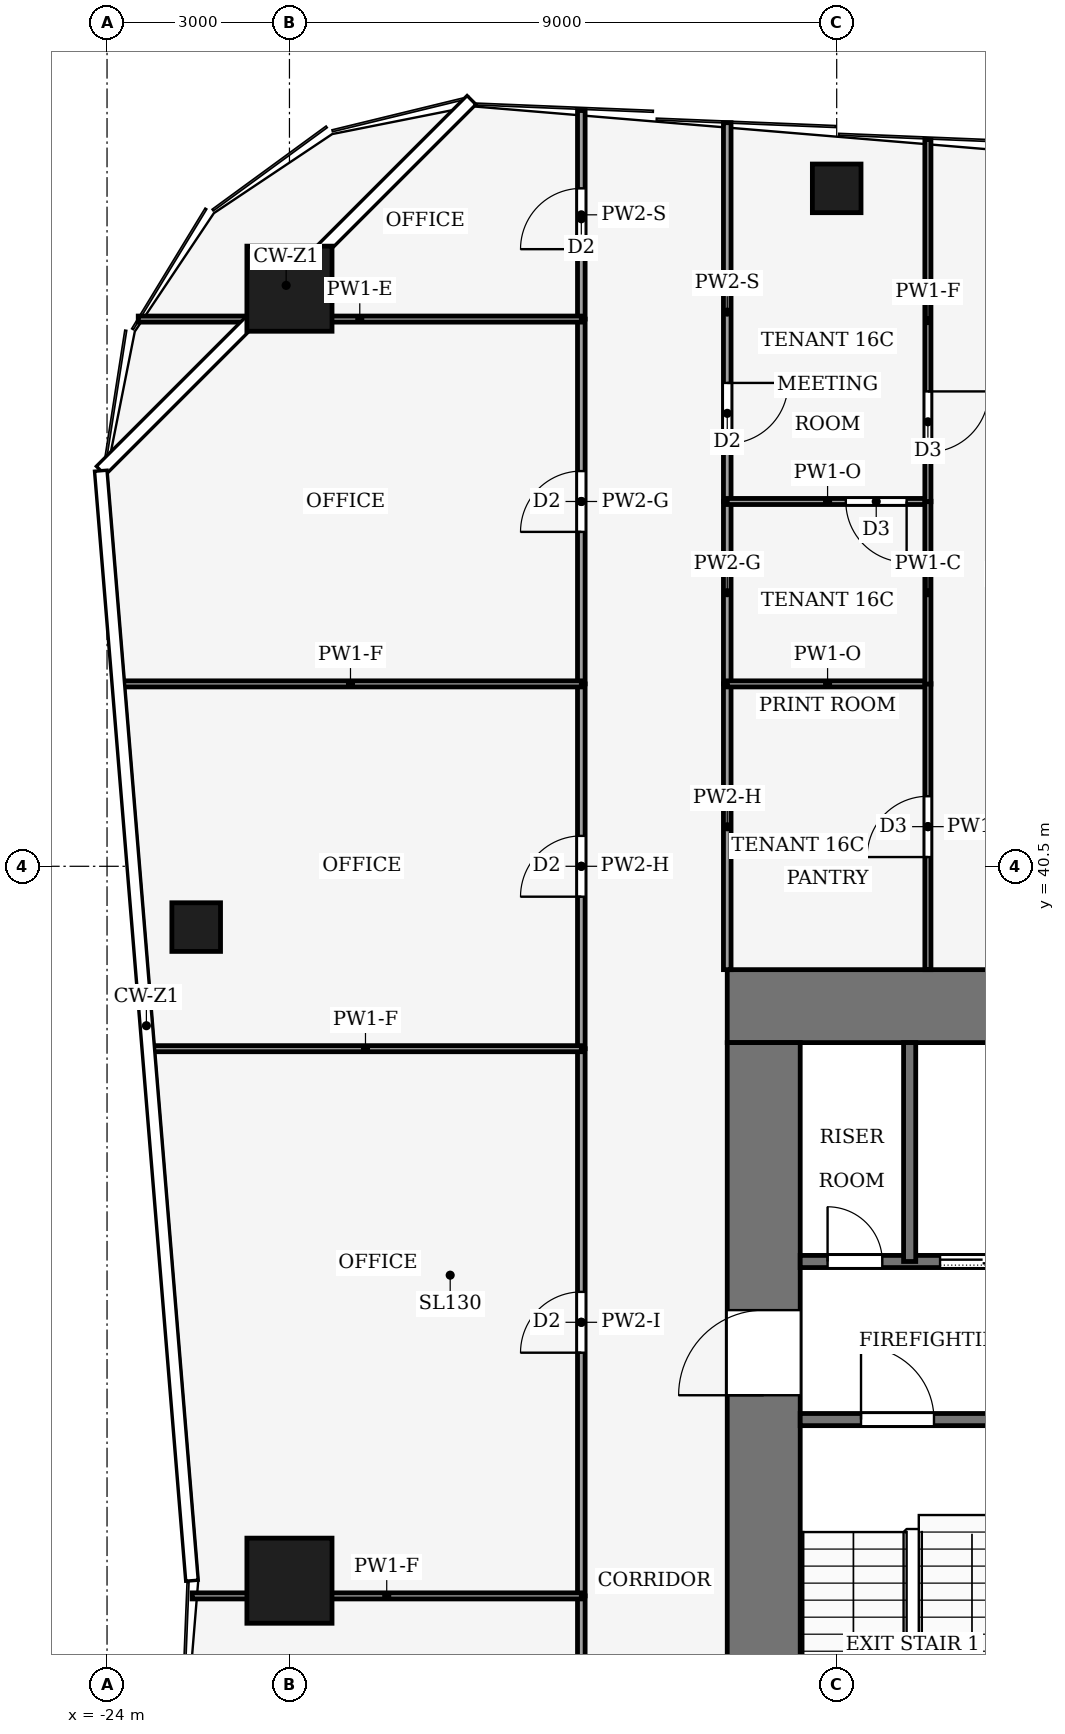
"""IFC4 building model, lengths in metres.
Left out: names, types, materials, properties, quantities, classifications, styles, units other than length and angle.
Written with IfcOpenShell. Run it as: python <this file> out.ifc"""

import sys

from ifc_helpers import new_model, si_unit, direction, frame, frame_2d, origin, origin_2d, place, context, subcontext, project, spatial, rectangle, hollow_rectangle, extrude, element, fill, save


model = new_model("IFC4")
c1 = context("Model", 3, precision=1e-05, world=origin(), true_north=direction((0.0, 1.0)))
c2 = subcontext(c1, "Body", "Model", "MODEL_VIEW")
j1 = project(units=[si_unit("LENGTHUNIT", "METRE"), si_unit("PLANEANGLEUNIT", "RADIAN")], contexts=[c1])
p1 = place(None, origin())
s1 = spatial("IfcSite", under=j1, at=p1, CompositionType="ELEMENT")
p2 = place(p1, origin())
s2 = spatial("IfcBuilding", under=s1, at=p2, CompositionType="ELEMENT")
p3 = place(p2, frame((0.0, 0.0, 74.0)))
s3 = spatial("IfcBuildingStorey", under=s2, at=p3, CompositionType="ELEMENT", Elevation=74.0)
p4 = place(p3, frame((-13.8, 38.2, -0.13), z_axis=(0.0, 0.0, 1.0), x_axis=(1.0, 0.0, 0.0)))
e1 = element("IfcWall", 1, at=p4, inside=s3, PredefinedType="SHEAR", context=c2, shape_type="SweptSolid", body=[
    extrude(rectangle(XDim=27.6, YDim=1.2, at=frame_2d((13.8, 0.0))), origin(), (0.0, 0.0, 1.0), 4.0),
])
p5 = place(p3, frame((-13.2, 18.4, -0.13), z_axis=(0.0, 0.0, 1.0), x_axis=(0.0, 1.0, 0.0)))
e2 = element("IfcWall", 2, at=p5, inside=s3, PredefinedType="SHEAR", context=c2, shape_type="SweptSolid", body=[
    extrude(rectangle(XDim=19.2, YDim=1.2, at=frame_2d((9.6, 0.0))), origin(), (0.0, 0.0, 1.0), 4.0),
])
p6 = place(p5, frame((2.8, 0.0, 0.13)))
e3 = element("IfcOpeningElement", 3, at=p6, cuts=e2, PredefinedType="OPENING", context=c2, shape_type="SweptSolid", body=[
    extrude(rectangle(XDim=2.4, YDim=2.4, at=frame_2d((1.2, 1.2))), frame((0.0, 0.61, 0.0), z_axis=(0.0, -1.0, 0.0), x_axis=(1.0, 0.0, 0.0)), (0.0, 0.0, 1.0), 1.22),
])
p7 = place(p5, frame((13.4, 0.0, 0.13)))
e4 = element("IfcOpeningElement", 4, at=p7, cuts=e2, PredefinedType="OPENING", context=c2, shape_type="SweptSolid", body=[
    extrude(rectangle(XDim=1.4, YDim=2.2, at=frame_2d((0.7, 1.1))), frame((0.0, 0.61, 0.0), z_axis=(0.0, -1.0, 0.0), x_axis=(1.0, 0.0, 0.0)), (0.0, 0.0, 1.0), 1.22),
])
for number, where, z_axis, x_axis in (
    (5, (-21.0, 50.0, 0.0), (0.0, 0.0, 1.0), (1.0, 0.0, 0.0)),
    (6, (-21.0, 28.75, 0.0), (0.0, 0.0, 1.0), (1.0, 0.0, 0.0)),
):
    element("IfcColumn", number, at=place(p3, frame(where, z_axis=z_axis, x_axis=x_axis)), inside=s3, PredefinedType="COLUMN", context=c2, shape_type="SweptSolid", body=[
        extrude(hollow_rectangle(XDim=1.4, YDim=1.4, WallThickness=0.08, at=origin_2d()), origin(), (0.0, 0.0, 1.0), 4.0),
    ])
for number, where, z_axis, x_axis in (
    (7, (-12.0, 51.65, 0.0), (0.0, 0.0, 1.0), (1.0, 0.0, 0.0)),
    (8, (-22.534, 39.5, 0.0), (0.0, 0.0, 1.0), (1.0, 0.0, 0.0)),
):
    element("IfcColumn", number, at=place(p3, frame(where, z_axis=z_axis, x_axis=x_axis)), inside=s3, PredefinedType="COLUMN", context=c2, shape_type="SweptSolid", body=[
        extrude(hollow_rectangle(XDim=0.8, YDim=0.8, WallThickness=0.04, at=origin_2d()), origin(), (0.0, 0.0, 1.0), 4.0),
    ])
p8 = place(p3, frame((-12.6, 31.4, 0.0), z_axis=(0.0, 0.0, 1.0), x_axis=(1.0, 0.0, 0.0)))
e9 = element("IfcWall", 9, at=p8, inside=s3, PredefinedType="PARTITIONING", context=c2, shape_type="SweptSolid", body=[
    extrude(rectangle(XDim=6.6, YDim=0.2, at=frame_2d((3.3, 0.0))), origin(), (0.0, 0.0, 1.0), 3.87),
])
p9 = place(p8, frame((1.0, 0.0, 0.0)))
e10 = element("IfcOpeningElement", 10, at=p9, cuts=e9, PredefinedType="OPENING", context=c2, shape_type="SweptSolid", body=[
    extrude(rectangle(XDim=1.2, YDim=2.2, at=frame_2d((0.6, 1.1))), frame((0.0, 0.11, 0.0), z_axis=(0.0, -1.0, 0.0), x_axis=(1.0, 0.0, 0.0)), (0.0, 0.0, 1.0), 0.22),
])
p10 = place(p3, frame((-12.6, 34.0, 0.0), z_axis=(0.0, 0.0, 1.0), x_axis=(1.0, 0.0, 0.0)))
e11 = element("IfcWall", 11, at=p10, inside=s3, PredefinedType="PARTITIONING", context=c2, shape_type="SweptSolid", body=[
    extrude(rectangle(XDim=6.6, YDim=0.2, at=frame_2d((3.3, 0.0))), origin(), (0.0, 0.0, 1.0), 3.87),
])
p11 = place(p10, frame((4.7, 0.0, 0.0)))
e12 = element("IfcOpeningElement", 12, at=p11, cuts=e11, PredefinedType="OPENING", context=c2, shape_type="SweptSolid", body=[
    extrude(rectangle(XDim=1.4, YDim=2.2, at=frame_2d((0.7, 1.1))), frame((0.0, 0.11, 0.0), z_axis=(0.0, -1.0, 0.0), x_axis=(1.0, 0.0, 0.0)), (0.0, 0.0, 1.0), 0.22),
])
p12 = place(p10, frame((2.3, 0.0, 0.0)))
e13 = element("IfcOpeningElement", 13, at=p12, cuts=e11, PredefinedType="OPENING", context=c2, shape_type="SweptSolid", body=[
    extrude(rectangle(XDim=1.4, YDim=2.2, at=frame_2d((0.7, 1.1))), frame((0.0, 0.11, 0.0), z_axis=(0.0, -1.0, 0.0), x_axis=(1.0, 0.0, 0.0)), (0.0, 0.0, 1.0), 0.22),
])
p13 = place(p10, frame((0.45, 0.0, 0.0)))
e14 = element("IfcOpeningElement", 14, at=p13, cuts=e11, PredefinedType="OPENING", context=c2, shape_type="SweptSolid", body=[
    extrude(rectangle(XDim=0.9, YDim=2.1, at=frame_2d((0.45, 1.05))), frame((0.0, 0.11, 0.0), z_axis=(0.0, -1.0, 0.0), x_axis=(1.0, 0.0, 0.0)), (0.0, 0.0, 1.0), 0.22),
])
p14 = place(p3, frame((-10.8, 34.0, 0.0), z_axis=(0.0, 0.0, 1.0), x_axis=(0.0, 1.0, 0.0)))
e15 = element("IfcWall", 15, at=p14, inside=s3, PredefinedType="PARTITIONING", context=c2, shape_type="SweptSolid", body=[
    extrude(rectangle(XDim=3.6, YDim=0.2, at=frame_2d((1.8, 0.0))), origin(), (0.0, 0.0, 1.0), 3.87),
])
p15 = place(p3, frame((-16.2, 25.5, 0.0), z_axis=(0.0, 0.0, 1.0), x_axis=(0.0, 1.0, 0.0)))
e16 = element("IfcWall", 16, at=p15, inside=s3, PredefinedType="PARTITIONING", context=c2, shape_type="SweptSolid", body=[
    extrude(rectangle(XDim=3.0, YDim=0.125, at=frame_2d((1.5, 0.0))), origin(), (0.0, 0.0, 1.0), 3.48),
])
p16 = place(p15, frame((1.0, 0.0, 0.0)))
e17 = element("IfcOpeningElement", 17, at=p16, cuts=e16, PredefinedType="OPENING", context=c2, shape_type="SweptSolid", body=[
    extrude(rectangle(XDim=1.0, YDim=2.1, at=frame_2d((0.5, 1.05))), frame((0.0, 0.073, 0.0), z_axis=(0.0, -1.0, 0.0), x_axis=(1.0, 0.0, 0.0)), (0.0, 0.0, 1.0), 0.145),
])
p17 = place(p3, frame((-16.2, 28.5, 0.0), z_axis=(0.0, 0.0, 1.0), x_axis=(0.0, 1.0, 0.0)))
e18 = element("IfcWall", 18, at=p17, inside=s3, PredefinedType="PARTITIONING", context=c2, shape_type="SweptSolid", body=[
    extrude(rectangle(XDim=9.0, YDim=0.125, at=frame_2d((4.5, 0.0))), origin(), (0.0, 0.0, 1.0), 3.48),
])
p18 = place(p17, frame((4.0, 0.0, 0.0)))
e19 = element("IfcOpeningElement", 19, at=p18, cuts=e18, PredefinedType="OPENING", context=c2, shape_type="SweptSolid", body=[
    extrude(rectangle(XDim=1.0, YDim=2.1, at=frame_2d((0.5, 1.05))), frame((0.0, 0.073, 0.0), z_axis=(0.0, -1.0, 0.0), x_axis=(1.0, 0.0, 0.0)), (0.0, 0.0, 1.0), 0.145),
])
p19 = place(p3, frame((-16.2, 37.5, 0.0), z_axis=(0.0, 0.0, 1.0), x_axis=(0.0, 1.0, 0.0)))
e20 = element("IfcWall", 20, at=p19, inside=s3, PredefinedType="PARTITIONING", context=c2, shape_type="SweptSolid", body=[
    extrude(rectangle(XDim=6.0, YDim=0.125, at=frame_2d((3.0, 0.0))), origin(), (0.0, 0.0, 1.0), 3.14),
])
p20 = place(p19, frame((2.5, 0.0, 0.0)))
e21 = element("IfcOpeningElement", 21, at=p20, cuts=e20, PredefinedType="OPENING", context=c2, shape_type="SweptSolid", body=[
    extrude(rectangle(XDim=1.0, YDim=2.1, at=frame_2d((0.5, 1.05))), frame((0.0, 0.073, 0.0), z_axis=(0.0, -1.0, 0.0), x_axis=(1.0, 0.0, 0.0)), (0.0, 0.0, 1.0), 0.145),
])
p21 = place(p3, frame((-16.2, 43.5, 0.0), z_axis=(0.0, 0.0, 1.0), x_axis=(0.0, 1.0, 0.0)))
e22 = element("IfcWall", 22, at=p21, inside=s3, PredefinedType="PARTITIONING", context=c2, shape_type="SweptSolid", body=[
    extrude(rectangle(XDim=6.0, YDim=0.125, at=frame_2d((3.0, 0.0))), origin(), (0.0, 0.0, 1.0), 3.87),
])
p22 = place(p21, frame((2.5, 0.0, 0.0)))
e23 = element("IfcOpeningElement", 23, at=p22, cuts=e22, PredefinedType="OPENING", context=c2, shape_type="SweptSolid", body=[
    extrude(rectangle(XDim=1.0, YDim=2.1, at=frame_2d((0.5, 1.05))), frame((0.0, 0.073, 0.0), z_axis=(0.0, -1.0, 0.0), x_axis=(1.0, 0.0, 0.0)), (0.0, 0.0, 1.0), 0.145),
])
p23 = place(p3, frame((-16.2, 49.5, 0.0), z_axis=(0.0, 0.0, 1.0), x_axis=(0.0, 1.0, 0.0)))
e24 = element("IfcWall", 24, at=p23, inside=s3, PredefinedType="PARTITIONING", context=c2, shape_type="SweptSolid", body=[
    extrude(rectangle(XDim=3.43, YDim=0.125, at=frame_2d((1.715, 0.0))), origin(), (0.0, 0.0, 1.0), 3.04),
])
p24 = place(p23, frame((1.15, 0.0, 0.0)))
e25 = element("IfcOpeningElement", 25, at=p24, cuts=e24, PredefinedType="OPENING", context=c2, shape_type="SweptSolid", body=[
    extrude(rectangle(XDim=1.0, YDim=2.1, at=frame_2d((0.5, 1.05))), frame((0.0, 0.073, 0.0), z_axis=(0.0, -1.0, 0.0), x_axis=(1.0, 0.0, 0.0)), (0.0, 0.0, 1.0), 0.145),
])
p25 = place(p3, frame((-13.8, 38.8, 0.0), z_axis=(0.0, 0.0, 1.0), x_axis=(0.0, 1.0, 0.0)))
e26 = element("IfcWall", 26, at=p25, inside=s3, PredefinedType="PARTITIONING", context=c2, shape_type="SweptSolid", body=[
    extrude(rectangle(XDim=4.7, YDim=0.125, at=frame_2d((2.35, 0.0))), origin(), (0.0, 0.0, 1.0), 3.14),
])
p26 = place(p3, frame((-13.8, 43.5, 0.0), z_axis=(0.0, 0.0, 1.0), x_axis=(0.0, 1.0, 0.0)))
e27 = element("IfcWall", 27, at=p26, inside=s3, PredefinedType="PARTITIONING", context=c2, shape_type="SweptSolid", body=[
    extrude(rectangle(XDim=3.0, YDim=0.125, at=frame_2d((1.5, 0.0))), origin(), (0.0, 0.0, 1.0), 3.87),
])
p27 = place(p3, frame((-13.8, 52.73, 0.0), z_axis=(0.0, 0.0, 1.0), x_axis=(0.0, -1.0, 0.0)))
e28 = element("IfcWall", 28, at=p27, inside=s3, PredefinedType="PARTITIONING", context=c2, shape_type="SweptSolid", body=[
    extrude(rectangle(XDim=6.23, YDim=0.125, at=frame_2d((3.115, 0.0))), origin(), (0.0, 0.0, 1.0), 3.04),
])
p28 = place(p27, frame((4.28, 0.0, 0.0)))
e29 = element("IfcOpeningElement", 29, at=p28, cuts=e28, PredefinedType="OPENING", context=c2, shape_type="SweptSolid", body=[
    extrude(rectangle(XDim=1.0, YDim=2.1, at=frame_2d((0.5, 1.05))), frame((0.0, 0.073, 0.0), z_axis=(0.0, -1.0, 0.0), x_axis=(1.0, 0.0, 0.0)), (0.0, 0.0, 1.0), 0.145),
])
p29 = place(p3, frame((-16.2, 28.5, 0.0), z_axis=(0.0, 0.0, 1.0), x_axis=(-1.0, 0.0, 0.0)))
e30 = element("IfcWall", 30, at=p29, inside=s3, PredefinedType="PARTITIONING", context=c2, shape_type="SweptSolid", body=[
    extrude(rectangle(XDim=6.401, YDim=0.1, at=frame_2d((3.2, 0.0))), origin(), (0.0, 0.0, 1.0), 3.04),
])
p30 = place(p3, frame((-16.2, 37.5, 0.0), z_axis=(0.0, 0.0, 1.0), x_axis=(-1.0, 0.0, 0.0)))
e31 = element("IfcWall", 31, at=p30, inside=s3, PredefinedType="PARTITIONING", context=c2, shape_type="SweptSolid", body=[
    extrude(rectangle(XDim=7.099, YDim=0.1, at=frame_2d((3.55, 0.0))), origin(), (0.0, 0.0, 1.0), 3.04),
])
p31 = place(p3, frame((-16.2, 43.5, 0.0), z_axis=(0.0, 0.0, 1.0), x_axis=(-1.0, 0.0, 0.0)))
e32 = element("IfcWall", 32, at=p31, inside=s3, PredefinedType="PARTITIONING", context=c2, shape_type="SweptSolid", body=[
    extrude(rectangle(XDim=7.592, YDim=0.1, at=frame_2d((3.796, 0.0))), origin(), (0.0, 0.0, 1.0), 3.04),
])
p32 = place(p3, frame((-16.2, 49.5, 0.0), z_axis=(0.0, 0.0, 1.0), x_axis=(-1.0, 0.0, 0.0)))
e33 = element("IfcWall", 33, at=p32, inside=s3, PredefinedType="PARTITIONING", context=c2, shape_type="SweptSolid", body=[
    extrude(rectangle(XDim=7.287, YDim=0.1, at=frame_2d((3.644, 0.0))), origin(), (0.0, 0.0, 1.0), 3.34),
])
p33 = place(p3, frame((-10.5, 43.5, 0.0), z_axis=(0.0, 0.0, 1.0), x_axis=(-1.0, 0.0, 0.0)))
e34 = element("IfcWall", 34, at=p33, inside=s3, PredefinedType="PARTITIONING", context=c2, shape_type="SweptSolid", body=[
    extrude(rectangle(XDim=3.3, YDim=0.1, at=frame_2d((1.65, 0.0))), origin(), (0.0, 0.0, 1.0), 3.39),
])
p34 = place(p3, frame((-10.5, 38.8, 0.0), z_axis=(0.0, 0.0, 1.0), x_axis=(0.0, 1.0, 0.0)))
e35 = element("IfcWall", 35, at=p34, inside=s3, PredefinedType="PARTITIONING", context=c2, shape_type="SweptSolid", body=[
    extrude(rectangle(XDim=4.704, YDim=0.1, at=frame_2d((2.352, 0.0))), origin(), (0.0, 0.0, 1.0), 3.87),
])
p35 = place(p34, frame((1.852, 0.0, 0.0)))
e36 = element("IfcOpeningElement", 36, at=p35, cuts=e35, PredefinedType="OPENING", context=c2, shape_type="SweptSolid", body=[
    extrude(rectangle(XDim=1.0, YDim=2.1, at=frame_2d((0.5, 1.05))), frame((0.0, 0.06, 0.0), z_axis=(0.0, -1.0, 0.0), x_axis=(1.0, 0.0, 0.0)), (0.0, 0.0, 1.0), 0.12),
])
p36 = place(p3, frame((-10.5, 46.5, 0.0), z_axis=(0.0, 0.0, 1.0), x_axis=(-1.0, 0.0, 0.0)))
e37 = element("IfcWall", 37, at=p36, inside=s3, PredefinedType="PARTITIONING", context=c2, shape_type="SweptSolid", body=[
    extrude(rectangle(XDim=3.3, YDim=0.1, at=frame_2d((1.65, 0.0))), origin(), (0.0, 0.0, 1.0), 3.39),
])
p37 = place(p36, frame((0.35, 0.0, 0.0)))
e38 = element("IfcOpeningElement", 38, at=p37, cuts=e37, PredefinedType="OPENING", context=c2, shape_type="SweptSolid", body=[
    extrude(rectangle(XDim=1.0, YDim=2.1, at=frame_2d((0.5, 1.05))), frame((0.0, 0.06, 0.0), z_axis=(0.0, -1.0, 0.0), x_axis=(1.0, 0.0, 0.0)), (0.0, 0.0, 1.0), 0.12),
])
p38 = place(p3, frame((-10.5, 43.496, 0.0), z_axis=(0.0, 0.0, 1.0), x_axis=(0.0, 1.0, 0.0)))
e39 = element("IfcWall", 39, at=p38, inside=s3, PredefinedType="PARTITIONING", context=c2, shape_type="SweptSolid", body=[
    extrude(rectangle(XDim=3.008, YDim=0.1, at=frame_2d((1.504, 0.0))), origin(), (0.0, 0.0, 1.0), 3.87),
])
p39 = place(p3, frame((-10.5, 52.455, 0.0), z_axis=(0.0, 0.0, 1.0), x_axis=(0.0, -1.0, 0.0)))
e40 = element("IfcWall", 40, at=p39, inside=s3, PredefinedType="PARTITIONING", context=c2, shape_type="SweptSolid", body=[
    extrude(rectangle(XDim=5.959, YDim=0.1, at=frame_2d((2.979, 0.0))), origin(), (0.0, 0.0, 1.0), 3.04),
])
p40 = place(p39, frame((4.145, 0.0, 0.0)))
e41 = element("IfcOpeningElement", 41, at=p40, cuts=e40, PredefinedType="OPENING", context=c2, shape_type="SweptSolid", body=[
    extrude(rectangle(XDim=1.0, YDim=2.1, at=frame_2d((0.5, 1.05))), frame((0.0, 0.06, 0.0), z_axis=(0.0, -1.0, 0.0), x_axis=(1.0, 0.0, 0.0)), (0.0, 0.0, 1.0), 0.12),
])
p41 = place(p12, origin())
e42 = element("IfcDoor", 42, at=p41, inside=s3, OperationType="SLIDING_TO_LEFT", PredefinedType="DOOR", context=c2, shape_type="SweptSolid", body=[
    extrude(rectangle(XDim=1.4, YDim=2.2, at=frame_2d((0.7, 1.1))), frame((0.0, 0.025, 0.0), z_axis=(0.0, -1.0, 0.0), x_axis=(1.0, 0.0, 0.0)), (0.0, 0.0, 1.0), 0.05),
])
fill(e13, e42)
p42 = place(p13, origin())
e43 = element("IfcDoor", 43, at=p42, inside=s3, OperationType="SINGLE_SWING_RIGHT", PredefinedType="DOOR", context=c2, shape_type="SweptSolid", body=[
    extrude(rectangle(XDim=0.9, YDim=2.1, at=frame_2d((0.45, 1.05))), frame((0.0, 0.025, 0.0), z_axis=(0.0, -1.0, 0.0), x_axis=(1.0, 0.0, 0.0)), (0.0, 0.0, 1.0), 0.05),
])
fill(e14, e43)
p43 = place(p9, origin())
e44 = element("IfcDoor", 44, at=p43, inside=s3, OperationType="SINGLE_SWING_RIGHT", PredefinedType="DOOR", context=c2, shape_type="SweptSolid", body=[
    extrude(rectangle(XDim=1.2, YDim=2.2, at=frame_2d((0.6, 1.1))), frame((0.0, 0.025, 0.0), z_axis=(0.0, -1.0, 0.0), x_axis=(1.0, 0.0, 0.0)), (0.0, 0.0, 1.0), 0.05),
])
fill(e10, e44)
p44 = place(p7, origin())
e45 = element("IfcDoor", 45, at=p44, inside=s3, OperationType="SINGLE_SWING_RIGHT", PredefinedType="DOOR", context=c2, shape_type="SweptSolid", body=[
    extrude(rectangle(XDim=1.4, YDim=2.2, at=frame_2d((0.7, 1.1))), frame((0.0, 0.025, 0.0), z_axis=(0.0, -1.0, 0.0), x_axis=(1.0, 0.0, 0.0)), (0.0, 0.0, 1.0), 0.05),
])
fill(e4, e45)
p45 = place(p18, origin())
e46 = element("IfcDoor", 46, at=p45, inside=s3, OperationType="SINGLE_SWING_LEFT", PredefinedType="DOOR", context=c2, shape_type="SweptSolid", body=[
    extrude(rectangle(XDim=1.0, YDim=2.1, at=frame_2d((0.5, 1.05))), frame((0.0, 0.025, 0.0), z_axis=(0.0, -1.0, 0.0), x_axis=(1.0, 0.0, 0.0)), (0.0, 0.0, 1.0), 0.05),
])
fill(e19, e46)
p46 = place(p20, origin())
e47 = element("IfcDoor", 47, at=p46, inside=s3, OperationType="SINGLE_SWING_RIGHT", PredefinedType="DOOR", context=c2, shape_type="SweptSolid", body=[
    extrude(rectangle(XDim=1.0, YDim=2.1, at=frame_2d((0.5, 1.05))), frame((0.0, 0.025, 0.0), z_axis=(0.0, -1.0, 0.0), x_axis=(1.0, 0.0, 0.0)), (0.0, 0.0, 1.0), 0.05),
])
fill(e21, e47)
p47 = place(p22, origin())
e48 = element("IfcDoor", 48, at=p47, inside=s3, OperationType="SINGLE_SWING_LEFT", PredefinedType="DOOR", context=c2, shape_type="SweptSolid", body=[
    extrude(rectangle(XDim=1.0, YDim=2.1, at=frame_2d((0.5, 1.05))), frame((0.0, 0.025, 0.0), z_axis=(0.0, -1.0, 0.0), x_axis=(1.0, 0.0, 0.0)), (0.0, 0.0, 1.0), 0.05),
])
fill(e23, e48)
p48 = place(p24, origin())
e49 = element("IfcDoor", 49, at=p48, inside=s3, OperationType="SINGLE_SWING_LEFT", PredefinedType="DOOR", context=c2, shape_type="SweptSolid", body=[
    extrude(rectangle(XDim=1.0, YDim=2.1, at=frame_2d((0.5, 1.05))), frame((0.0, 0.025, 0.0), z_axis=(0.0, -1.0, 0.0), x_axis=(1.0, 0.0, 0.0)), (0.0, 0.0, 1.0), 0.05),
])
fill(e25, e49)
p49 = place(p28, origin())
e50 = element("IfcDoor", 50, at=p49, inside=s3, OperationType="SINGLE_SWING_RIGHT", PredefinedType="DOOR", context=c2, shape_type="SweptSolid", body=[
    extrude(rectangle(XDim=1.0, YDim=2.1, at=frame_2d((0.5, 1.05))), frame((0.0, 0.025, 0.0), z_axis=(0.0, -1.0, 0.0), x_axis=(1.0, 0.0, 0.0)), (0.0, 0.0, 1.0), 0.05),
])
fill(e29, e50)
p50 = place(p35, origin())
e51 = element("IfcDoor", 51, at=p50, inside=s3, OperationType="SINGLE_SWING_RIGHT", PredefinedType="DOOR", context=c2, shape_type="SweptSolid", body=[
    extrude(rectangle(XDim=1.0, YDim=2.1, at=frame_2d((0.5, 1.05))), frame((0.0, 0.025, 0.0), z_axis=(0.0, -1.0, 0.0), x_axis=(1.0, 0.0, 0.0)), (0.0, 0.0, 1.0), 0.05),
])
fill(e36, e51)
p51 = place(p37, origin())
e52 = element("IfcDoor", 52, at=p51, inside=s3, OperationType="SINGLE_SWING_LEFT", PredefinedType="DOOR", context=c2, shape_type="SweptSolid", body=[
    extrude(rectangle(XDim=1.0, YDim=2.1, at=frame_2d((0.5, 1.05))), frame((0.0, 0.025, 0.0), z_axis=(0.0, -1.0, 0.0), x_axis=(1.0, 0.0, 0.0)), (0.0, 0.0, 1.0), 0.05),
])
fill(e38, e52)
p52 = place(p40, origin())
e53 = element("IfcDoor", 53, at=p52, inside=s3, OperationType="SINGLE_SWING_RIGHT", PredefinedType="DOOR", context=c2, shape_type="SweptSolid", body=[
    extrude(rectangle(XDim=1.0, YDim=2.1, at=frame_2d((0.5, 1.05))), frame((0.0, 0.025, 0.0), z_axis=(0.0, -1.0, 0.0), x_axis=(1.0, 0.0, 0.0)), (0.0, 0.0, 1.0), 0.05),
])
fill(e41, e53)
save(model, sys.argv[1])
